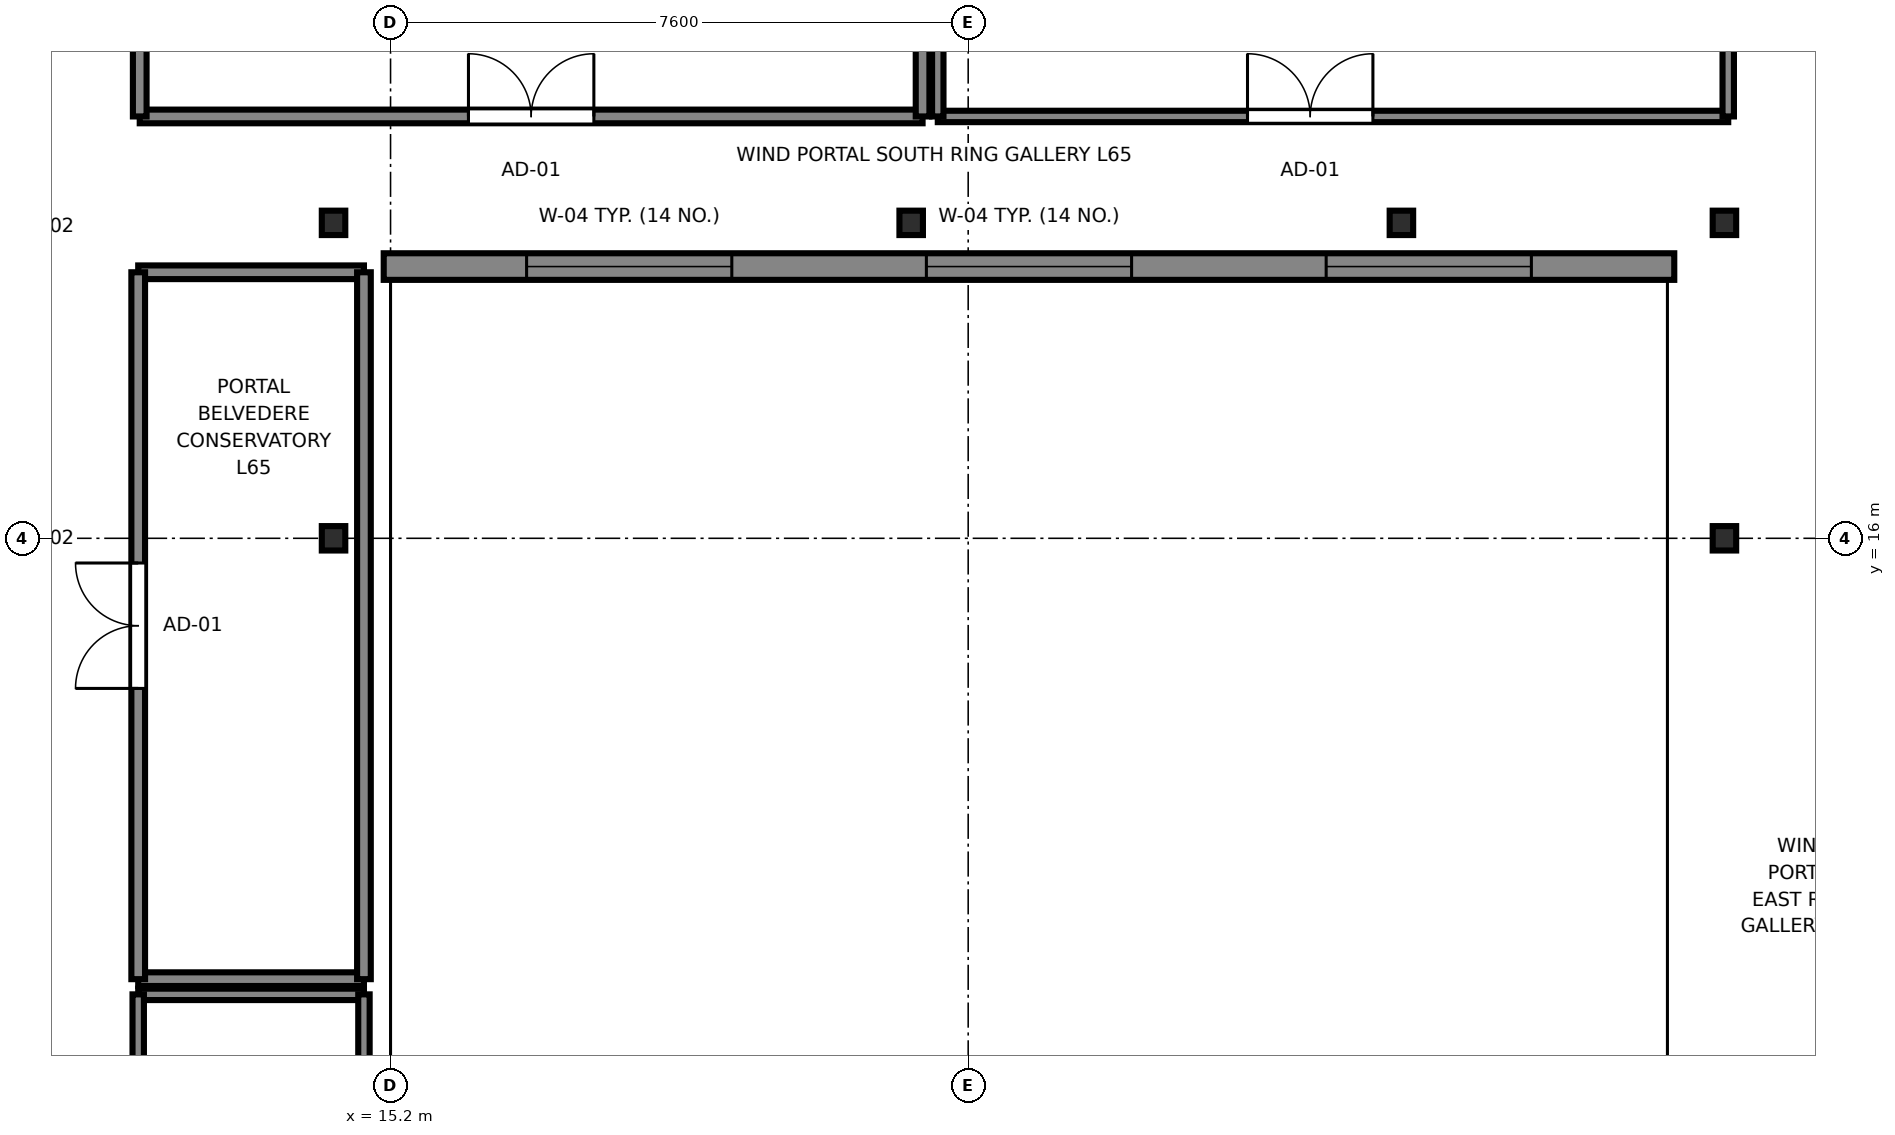
"""IFC4 building model, lengths in metres.
Left out: names, types, materials, properties, quantities, classifications, styles, units other than length and angle.
Written with IfcOpenShell. Run it as: python <this file> out.ifc"""

import sys

from ifc_helpers import new_model, si_unit, direction, frame, frame_2d, origin, origin_2d, place, context, subcontext, project, spatial, rectangle, i_section, extrude, source, transform, mapped, element, fill, save


model = new_model("IFC4")
c1 = context("Model", 3, precision=1e-05, world=origin(), true_north=direction((0.0, 1.0)))
c2 = subcontext(c1, "Body", "Model", "MODEL_VIEW")
j1 = project(units=[si_unit("LENGTHUNIT", "METRE"), si_unit("PLANEANGLEUNIT", "RADIAN")], contexts=[c1])
p1 = place(None, origin())
s1 = spatial("IfcSite", under=j1, at=p1, CompositionType="ELEMENT")
p2 = place(p1, origin())
s2 = spatial("IfcBuilding", under=s1, at=p2, CompositionType="ELEMENT")
p3 = place(p2, frame((0.0, 0.0, 245.2)))
s3 = spatial("IfcBuildingStorey", under=s2, at=p3, CompositionType="ELEMENT", Elevation=245.2)
m1 = source(origin(), c2, "Body", "SweptSolid", [
    extrude(i_section(OverallWidth=0.309, OverallDepth=0.321, WebThickness=0.014, FlangeThickness=0.022, FilletRadius=0.017, at=origin_2d()), origin(), (0.0, 0.0, 1.0), 3.55),
])
for number, where, z_axis, x_axis in (
    (1, (14.45, 16.0, 0.0), (0.0, 0.0, 1.0), (1.0, 0.0, 0.0)),
    (2, (32.75, 16.0, 0.0), (0.0, 0.0, 1.0), (1.0, 0.0, 0.0)),
    (3, (14.45, 20.15, 0.0), (0.0, 0.0, 1.0), (1.0, 0.0, 0.0)),
    (4, (22.05, 20.15, 0.0), (0.0, 0.0, 1.0), (1.0, 0.0, 0.0)),
    (5, (28.5, 20.15, 0.0), (0.0, 0.0, 1.0), (1.0, 0.0, 0.0)),
    (6, (32.75, 20.15, 0.0), (0.0, 0.0, 1.0), (1.0, 0.0, 0.0)),
):
    element("IfcColumn", number, at=place(p3, frame(where, z_axis=z_axis, x_axis=x_axis)), inside=s3, PredefinedType="COLUMN", context=c2, shape_type="MappedRepresentation", body=[
        mapped(m1, transform((0.0, 0.0, 0.0), x_axis=(1.0, 0.0, 0.0), y_axis=(0.0, 1.0, 0.0), z_axis=(0.0, 0.0, 1.0), scale=1.0)),
    ])
p4 = place(p3, frame((15.11, 19.575, 0.0), z_axis=(0.0, 0.0, 1.0), x_axis=(1.0, 0.0, 0.0)))
e7 = element("IfcWall", 7, at=p4, inside=s3, PredefinedType="SOLIDWALL", context=c2, shape_type="SweptSolid", body=[
    extrude(rectangle(XDim=16.98, YDim=0.35, at=frame_2d((8.49, 0.0))), origin(), (0.0, 0.0, 1.0), 3.37),
])
p5 = place(p4, frame((1.88, 0.0, 0.68)))
e8 = element("IfcOpeningElement", 8, at=p5, cuts=e7, PredefinedType="OPENING", context=c2, shape_type="SweptSolid", body=[
    extrude(rectangle(XDim=2.7, YDim=1.95, at=frame_2d((1.35, 0.975))), frame((0.0, 0.185, 0.0), z_axis=(0.0, -1.0, 0.0), x_axis=(1.0, 0.0, 0.0)), (0.0, 0.0, 1.0), 0.37),
])
p6 = place(p4, frame((7.14, 0.0, 0.68)))
e9 = element("IfcOpeningElement", 9, at=p6, cuts=e7, PredefinedType="OPENING", context=c2, shape_type="SweptSolid", body=[
    extrude(rectangle(XDim=2.7, YDim=1.95, at=frame_2d((1.35, 0.975))), frame((0.0, 0.185, 0.0), z_axis=(0.0, -1.0, 0.0), x_axis=(1.0, 0.0, 0.0)), (0.0, 0.0, 1.0), 0.37),
])
p7 = place(p4, frame((12.4, 0.0, 0.68)))
e10 = element("IfcOpeningElement", 10, at=p7, cuts=e7, PredefinedType="OPENING", context=c2, shape_type="SweptSolid", body=[
    extrude(rectangle(XDim=2.7, YDim=1.95, at=frame_2d((1.35, 0.975))), frame((0.0, 0.185, 0.0), z_axis=(0.0, -1.0, 0.0), x_axis=(1.0, 0.0, 0.0)), (0.0, 0.0, 1.0), 0.37),
])
for number, where, z_axis, x_axis in (
    (11, (11.88, 10.2, 0.0), (0.0, 0.0, 1.0), (1.0, 0.0, 0.0)),
    (12, (11.88, 19.5, 0.0), (0.0, 0.0, 1.0), (1.0, 0.0, 0.0)),
):
    element("IfcWall", number, at=place(p3, frame(where, z_axis=z_axis, x_axis=x_axis)), inside=s3, PredefinedType="PARTITIONING", context=c2, shape_type="SweptSolid", body=[
        extrude(rectangle(XDim=2.97, YDim=0.18, at=frame_2d((1.485, 0.0))), origin(), (0.0, 0.0, 1.0), 3.37),
    ])
p8 = place(p3, frame((11.88, 10.2, 0.0), z_axis=(0.0, 0.0, 1.0), x_axis=(0.0, 1.0, 0.0)))
e13 = element("IfcWall", 13, at=p8, inside=s3, PredefinedType="PARTITIONING", context=c2, shape_type="SweptSolid", body=[
    extrude(rectangle(XDim=9.3, YDim=0.18, at=frame_2d((4.65, 0.0))), origin(), (0.0, 0.0, 1.0), 3.37),
])
p9 = place(p8, frame((3.825, 0.0, 0.0)))
e14 = element("IfcOpeningElement", 14, at=p9, cuts=e13, PredefinedType="OPENING", context=c2, shape_type="SweptSolid", body=[
    extrude(rectangle(XDim=1.65, YDim=2.15, at=frame_2d((0.825, 1.075))), frame((0.0, 0.1, 0.0), z_axis=(0.0, -1.0, 0.0), x_axis=(1.0, 0.0, 0.0)), (0.0, 0.0, 1.0), 0.2),
])
p10 = place(p3, frame((14.85, 10.2, 0.0), z_axis=(0.0, 0.0, 1.0), x_axis=(0.0, 1.0, 0.0)))
e15 = element("IfcWall", 15, at=p10, inside=s3, PredefinedType="PARTITIONING", context=c2, shape_type="SweptSolid", body=[
    extrude(rectangle(XDim=9.3, YDim=0.18, at=frame_2d((4.65, 0.0))), origin(), (0.0, 0.0, 1.0), 3.37),
])
p11 = place(p3, frame((11.88, 10.0, 0.0), z_axis=(0.0, 0.0, 1.0), x_axis=(1.0, 0.0, 0.0)))
e16 = element("IfcWall", 16, at=p11, inside=s3, PredefinedType="PARTITIONING", context=c2, shape_type="SweptSolid", body=[
    extrude(rectangle(XDim=2.97, YDim=0.15, at=frame_2d((1.485, 0.0))), origin(), (0.0, 0.0, 1.0), 3.37),
])
p12 = place(p3, frame((11.88, 3.005, 0.0), z_axis=(0.0, 0.0, 1.0), x_axis=(0.0, 1.0, 0.0)))
e17 = element("IfcWall", 17, at=p12, inside=s3, PredefinedType="PARTITIONING", context=c2, shape_type="SweptSolid", body=[
    extrude(rectangle(XDim=6.995, YDim=0.15, at=frame_2d((3.498, 0.0))), origin(), (0.0, 0.0, 1.0), 3.37),
])
p13 = place(p12, frame((2.673, 0.0, 0.0)))
e18 = element("IfcOpeningElement", 18, at=p13, cuts=e17, PredefinedType="OPENING", context=c2, shape_type="SweptSolid", body=[
    extrude(rectangle(XDim=1.65, YDim=2.15, at=frame_2d((0.825, 1.075))), frame((0.0, 0.085, 0.0), z_axis=(0.0, -1.0, 0.0), x_axis=(1.0, 0.0, 0.0)), (0.0, 0.0, 1.0), 0.17),
])
p14 = place(p3, frame((14.85, 3.005, 0.0), z_axis=(0.0, 0.0, 1.0), x_axis=(0.0, 1.0, 0.0)))
e19 = element("IfcWall", 19, at=p14, inside=s3, PredefinedType="PARTITIONING", context=c2, shape_type="SweptSolid", body=[
    extrude(rectangle(XDim=6.995, YDim=0.15, at=frame_2d((3.498, 0.0))), origin(), (0.0, 0.0, 1.0), 3.37),
])
p15 = place(p3, frame((11.9, 21.55, 0.0), z_axis=(0.0, 0.0, 1.0), x_axis=(1.0, 0.0, 0.0)))
e20 = element("IfcWall", 20, at=p15, inside=s3, PredefinedType="PARTITIONING", context=c2, shape_type="SweptSolid", body=[
    extrude(rectangle(XDim=10.3, YDim=0.18, at=frame_2d((5.15, 0.0))), origin(), (0.0, 0.0, 1.0), 3.37),
])
p16 = place(p15, frame((4.325, 0.0, 0.0)))
e21 = element("IfcOpeningElement", 21, at=p16, cuts=e20, PredefinedType="OPENING", context=c2, shape_type="SweptSolid", body=[
    extrude(rectangle(XDim=1.65, YDim=2.15, at=frame_2d((0.825, 1.075))), frame((0.0, 0.1, 0.0), z_axis=(0.0, -1.0, 0.0), x_axis=(1.0, 0.0, 0.0)), (0.0, 0.0, 1.0), 0.2),
])
p17 = place(p3, frame((11.9, 21.55, 0.0), z_axis=(0.0, 0.0, 1.0), x_axis=(0.0, 1.0, 0.0)))
e22 = element("IfcWall", 22, at=p17, inside=s3, PredefinedType="PARTITIONING", context=c2, shape_type="SweptSolid", body=[
    extrude(rectangle(XDim=8.15, YDim=0.18, at=frame_2d((4.075, 0.0))), origin(), (0.0, 0.0, 1.0), 3.37),
])
p18 = place(p3, frame((22.2, 21.55, 0.0), z_axis=(0.0, 0.0, 1.0), x_axis=(0.0, 1.0, 0.0)))
e23 = element("IfcWall", 23, at=p18, inside=s3, PredefinedType="PARTITIONING", context=c2, shape_type="SweptSolid", body=[
    extrude(rectangle(XDim=8.15, YDim=0.18, at=frame_2d((4.075, 0.0))), origin(), (0.0, 0.0, 1.0), 2.827),
])
p19 = place(p3, frame((22.4, 21.55, 0.0), z_axis=(0.0, 0.0, 1.0), x_axis=(1.0, 0.0, 0.0)))
e24 = element("IfcWall", 24, at=p19, inside=s3, PredefinedType="PARTITIONING", context=c2, shape_type="SweptSolid", body=[
    extrude(rectangle(XDim=10.4, YDim=0.15, at=frame_2d((5.2, 0.0))), origin(), (0.0, 0.0, 1.0), 3.37),
])
p20 = place(p19, frame((4.075, 0.0, 0.0)))
e25 = element("IfcOpeningElement", 25, at=p20, cuts=e24, PredefinedType="OPENING", context=c2, shape_type="SweptSolid", body=[
    extrude(rectangle(XDim=1.65, YDim=2.15, at=frame_2d((0.825, 1.075))), frame((0.0, 0.085, 0.0), z_axis=(0.0, -1.0, 0.0), x_axis=(1.0, 0.0, 0.0)), (0.0, 0.0, 1.0), 0.17),
])
p21 = place(p3, frame((22.4, 21.55, 0.0), z_axis=(0.0, 0.0, 1.0), x_axis=(0.0, 1.0, 0.0)))
e26 = element("IfcWall", 26, at=p21, inside=s3, PredefinedType="PARTITIONING", context=c2, shape_type="SweptSolid", body=[
    extrude(rectangle(XDim=8.15, YDim=0.15, at=frame_2d((4.075, 0.0))), origin(), (0.0, 0.0, 1.0), 3.37),
])
p22 = place(p3, frame((32.8, 21.55, 0.0), z_axis=(0.0, 0.0, 1.0), x_axis=(0.0, 1.0, 0.0)))
e27 = element("IfcWall", 27, at=p22, inside=s3, PredefinedType="PARTITIONING", context=c2, shape_type="SweptSolid", body=[
    extrude(rectangle(XDim=8.15, YDim=0.15, at=frame_2d((4.075, 0.0))), origin(), (0.0, 0.0, 1.0), 2.827),
])
m2 = source(origin(), c2, "Body", "SweptSolid", [
    extrude(rectangle(XDim=2.7, YDim=1.95, at=frame_2d((1.35, 0.975))), frame((0.0, 0.09, 0.0), z_axis=(0.0, -1.0, 0.0), x_axis=(1.0, 0.0, 0.0)), (0.0, 0.0, 1.0), 0.06),
])
p23 = place(p5, origin())
e28 = element("IfcWindow", 28, at=p23, inside=s3, PartitioningType="TRIPLE_PANEL_HORIZONTAL", PredefinedType="WINDOW", context=c2, shape_type="MappedRepresentation", body=[
    mapped(m2, transform((0.0, 0.0, 0.0), x_axis=(1.0, 0.0, 0.0), y_axis=(0.0, 1.0, 0.0), z_axis=(0.0, 0.0, 1.0), scale=1.0)),
])
fill(e8, e28)
p24 = place(p6, origin())
e29 = element("IfcWindow", 29, at=p24, inside=s3, PartitioningType="TRIPLE_PANEL_HORIZONTAL", PredefinedType="WINDOW", context=c2, shape_type="MappedRepresentation", body=[
    mapped(m2, transform((0.0, 0.0, 0.0), x_axis=(1.0, 0.0, 0.0), y_axis=(0.0, 1.0, 0.0), z_axis=(0.0, 0.0, 1.0), scale=1.0)),
])
fill(e9, e29)
p25 = place(p7, origin())
e30 = element("IfcWindow", 30, at=p25, inside=s3, PartitioningType="TRIPLE_PANEL_HORIZONTAL", PredefinedType="WINDOW", context=c2, shape_type="MappedRepresentation", body=[
    mapped(m2, transform((0.0, 0.0, 0.0), x_axis=(1.0, 0.0, 0.0), y_axis=(0.0, 1.0, 0.0), z_axis=(0.0, 0.0, 1.0), scale=1.0)),
])
fill(e10, e30)
m3 = source(origin(), c2, "Body", "SweptSolid", [
    extrude(rectangle(XDim=1.65, YDim=2.15, at=frame_2d((0.825, 1.075))), frame((0.0, 0.025, 0.0), z_axis=(0.0, -1.0, 0.0), x_axis=(1.0, 0.0, 0.0)), (0.0, 0.0, 1.0), 0.05),
])
p26 = place(p9, origin())
e31 = element("IfcDoor", 31, at=p26, inside=s3, OperationType="DOUBLE_DOOR_SINGLE_SWING", PredefinedType="DOOR", context=c2, shape_type="MappedRepresentation", body=[
    mapped(m3, transform((0.0, 0.0, 0.0), x_axis=(1.0, 0.0, 0.0), y_axis=(0.0, 1.0, 0.0), z_axis=(0.0, 0.0, 1.0), scale=1.0)),
])
fill(e14, e31)
p27 = place(p16, origin())
e32 = element("IfcDoor", 32, at=p27, inside=s3, OperationType="DOUBLE_DOOR_SINGLE_SWING", PredefinedType="DOOR", context=c2, shape_type="MappedRepresentation", body=[
    mapped(m3, transform((0.0, 0.0, 0.0), x_axis=(1.0, 0.0, 0.0), y_axis=(0.0, 1.0, 0.0), z_axis=(0.0, 0.0, 1.0), scale=1.0)),
])
fill(e21, e32)
p28 = place(p20, origin())
e33 = element("IfcDoor", 33, at=p28, inside=s3, OperationType="DOUBLE_DOOR_SINGLE_SWING", PredefinedType="DOOR", context=c2, shape_type="MappedRepresentation", body=[
    mapped(m3, transform((0.0, 0.0, 0.0), x_axis=(1.0, 0.0, 0.0), y_axis=(0.0, 1.0, 0.0), z_axis=(0.0, 0.0, 1.0), scale=1.0)),
])
fill(e25, e33)
save(model, sys.argv[1])
